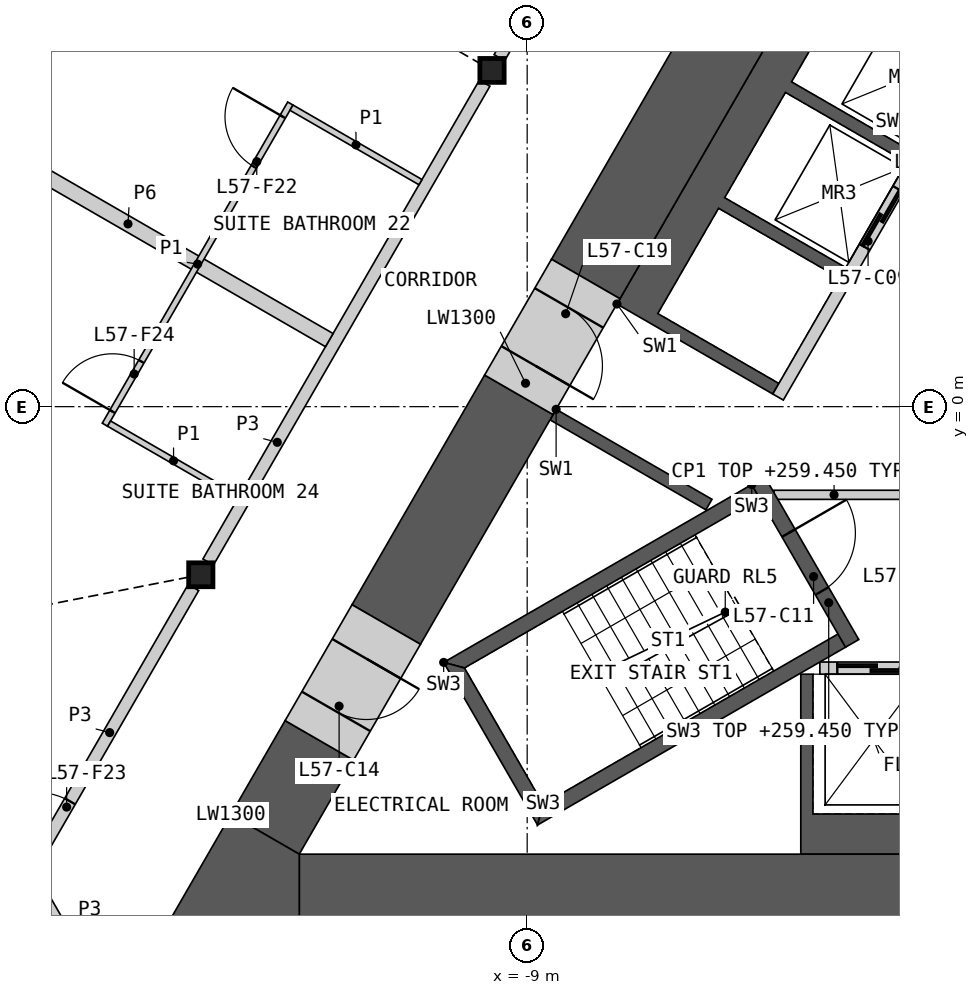
"""IFC4 building model, lengths in metres.
Left out: names, types, materials, properties, quantities, classifications, styles, units other than length and angle.
Written with IfcOpenShell. Run it as: python <this file> out.ifc"""

import sys

from ifc_helpers import new_model, si_unit, direction, frame, frame_2d, origin, origin_2d, place, context, subcontext, project, spatial, polyline, rectangle, i_section, outline, extrude, element, fill, save


model = new_model("IFC4")
c1 = context("Model", 3, precision=1e-05, world=origin(), true_north=direction((0.0, 1.0)))
c2 = subcontext(c1, "Body", "Model", "MODEL_VIEW")
j1 = project(units=[si_unit("LENGTHUNIT", "METRE"), si_unit("PLANEANGLEUNIT", "RADIAN")], contexts=[c1])
p1 = place(None, origin())
s1 = spatial("IfcSite", under=j1, at=p1, CompositionType="ELEMENT")
p2 = place(p1, origin())
s2 = spatial("IfcBuilding", under=s1, at=p2, CompositionType="ELEMENT")
p3 = place(p2, frame((0.0, 0.0, 256.2)))
s3 = spatial("IfcBuildingStorey", under=s2, at=p3, CompositionType="ELEMENT", Elevation=256.2)
for number, where, z_axis, x_axis in (
    (1, (-9.578, 5.53, 0.0), (0.0, 0.0, 1.0), (1.0, 0.0, 0.0)),
    (2, (-14.368, -2.765, 0.0), (0.0, 0.0, 1.0), (1.0, 0.0, 0.0)),
):
    element("IfcColumn", number, at=place(p3, frame(where, z_axis=z_axis, x_axis=x_axis)), inside=s3, PredefinedType="COLUMN", context=c2, shape_type="SweptSolid", body=[
        extrude(i_section(OverallWidth=0.399, OverallDepth=0.393, WebThickness=0.023, FlangeThickness=0.037, at=origin_2d()), origin(), (0.0, 0.0, 1.0), 3.6),
    ])
p4 = place(p3, origin())
e3 = element("IfcWall", 3, at=p4, inside=s3, PredefinedType="SHEAR", context=c2, shape_type="SweptSolid", body=[
    extrude(outline(polyline([(0.1, -7.36), (-4.5, -7.36), (-4.5, -4.4), (-4.3, -4.4), (-4.3, -6.7), (-2.3, -6.7), (-2.3, -4.4), (-2.1, -4.4), (-2.1, -6.7), (-0.1, -6.7), (-0.1, -4.4), (0.1, -4.4), (0.1, -7.36)])), origin(), (0.0, 0.0, 1.0), 3.25),
])
p5 = place(p3, frame((-4.187, -4.3, 0.0), z_axis=(0.0, 0.0, 1.0), x_axis=(1.0, 0.0, 0.0)))
e4 = element("IfcWall", 4, at=p5, inside=s3, PredefinedType="SOLIDWALL", context=c2, shape_type="SweptSolid", body=[
    extrude(rectangle(XDim=8.373, YDim=0.2, at=frame_2d((4.187, 0.0))), origin(), (0.0, 0.0, 1.0), 3.25),
])
p6 = place(p5, frame((0.287, 0.0, 0.0)))
e5 = element("IfcOpeningElement", 5, at=p6, cuts=e4, PredefinedType="OPENING", context=c2, shape_type="SweptSolid", body=[
    extrude(rectangle(XDim=1.2, YDim=2.1, at=frame_2d((0.6, 1.05))), frame((0.0, 0.11, 0.0), z_axis=(0.0, -1.0, 0.0), x_axis=(1.0, 0.0, 0.0)), (0.0, 0.0, 1.0), 0.22),
])
p7 = place(p5, frame((2.387, 0.0, 0.0)))
e6 = element("IfcOpeningElement", 6, at=p7, cuts=e4, PredefinedType="OPENING", context=c2, shape_type="SweptSolid", body=[
    extrude(rectangle(XDim=1.4, YDim=2.1, at=frame_2d((0.7, 1.05))), frame((0.0, 0.11, 0.0), z_axis=(0.0, -1.0, 0.0), x_axis=(1.0, 0.0, 0.0)), (0.0, 0.0, 1.0), 0.22),
])
p8 = place(p5, frame((4.837, 0.0, 0.0)))
e7 = element("IfcOpeningElement", 7, at=p8, cuts=e4, PredefinedType="OPENING", context=c2, shape_type="SweptSolid", body=[
    extrude(rectangle(XDim=0.9, YDim=2.1, at=frame_2d((0.45, 1.05))), frame((0.0, 0.11, 0.0), z_axis=(0.0, -1.0, 0.0), x_axis=(1.0, 0.0, 0.0)), (0.0, 0.0, 1.0), 0.22),
])
p9 = place(p5, frame((6.887, 0.0, 0.0)))
e8 = element("IfcOpeningElement", 8, at=p9, cuts=e4, PredefinedType="OPENING", context=c2, shape_type="SweptSolid", body=[
    extrude(rectangle(XDim=1.2, YDim=2.1, at=frame_2d((0.6, 1.05))), frame((0.0, 0.11, 0.0), z_axis=(0.0, -1.0, 0.0), x_axis=(1.0, 0.0, 0.0)), (0.0, 0.0, 1.0), 0.22),
])
p10 = place(p3, origin())
e9 = element("IfcWall", 9, at=p10, inside=s3, PredefinedType="SHEAR", context=c2, shape_type="SweptSolid", body=[
    extrude(outline(polyline([(-7.524, 1.688), (-4.124, 7.577), (-3.731, 7.35), (-1.561, 6.097), (-1.66, 5.924), (-3.652, 7.074), (-4.652, 5.342), (-2.66, 4.192), (-2.76, 4.019), (-4.752, 5.169), (-5.752, 3.437), (-3.76, 2.287), (-3.861, 2.113), (-5.852, 3.263), (-6.852, 1.531), (-4.861, 0.381), (-4.96, 0.208), (-7.131, 1.461), (-7.524, 1.688)])), origin(), (0.0, 0.0, 1.0), 3.25),
])
p11 = place(p3, origin())
e10 = element("IfcWall", 10, at=p11, inside=s3, PredefinedType="SHEAR", context=c2, shape_type="SweptSolid", body=[
    extrude(outline(polyline([(-8.524, -0.044), (-8.131, -0.271), (-5.96, -1.524), (-6.061, -1.697), (-8.231, -0.444), (-8.624, -0.217), (-8.524, -0.044)])), origin(), (0.0, 0.0, 1.0), 3.25),
])
p12 = place(p3, frame((-1.631, 5.776, 0.0), z_axis=(0.0, 0.0, 1.0), x_axis=(-0.499992876559, -0.866029516466, 0.0)))
e11 = element("IfcWall", 11, at=p12, inside=s3, PredefinedType="SOLIDWALL", context=c2, shape_type="SweptSolid", body=[
    extrude(rectangle(XDim=6.486, YDim=0.2, at=frame_2d((3.243, 0.0))), origin(), (0.0, 0.0, 1.0), 3.25),
])
p13 = place(p12, frame((0.337, 0.0, 0.0)))
e12 = element("IfcOpeningElement", 12, at=p13, cuts=e11, PredefinedType="OPENING", context=c2, shape_type="SweptSolid", body=[
    extrude(rectangle(XDim=1.1, YDim=2.1, at=frame_2d((0.55, 1.05))), frame((0.0, 0.11, 0.0), z_axis=(0.0, -1.0, 0.0), x_axis=(1.0, 0.0, 0.0)), (0.0, 0.0, 1.0), 0.22),
])
p14 = place(p12, frame((2.537, 0.0, 0.0)))
e13 = element("IfcOpeningElement", 13, at=p14, cuts=e11, PredefinedType="OPENING", context=c2, shape_type="SweptSolid", body=[
    extrude(rectangle(XDim=1.1, YDim=2.1, at=frame_2d((0.55, 1.05))), frame((0.0, 0.11, 0.0), z_axis=(0.0, -1.0, 0.0), x_axis=(1.0, 0.0, 0.0)), (0.0, 0.0, 1.0), 0.22),
])
p15 = place(p3, frame((-4.941, -1.45, 0.0), z_axis=(0.0, 0.0, 1.0), x_axis=(1.0, 0.0, 0.0)))
e14 = element("IfcWall", 14, at=p15, inside=s3, PredefinedType="PARTITIONING", context=c2, shape_type="SweptSolid", body=[
    extrude(rectangle(XDim=9.882, YDim=0.15, at=frame_2d((4.941, 0.0))), origin(), (0.0, 0.0, 1.0), 3.25),
])
p16 = place(p15, frame((4.391, 0.0, 0.0)))
e15 = element("IfcOpeningElement", 15, at=p16, cuts=e14, PredefinedType="OPENING", context=c2, shape_type="SweptSolid", body=[
    extrude(rectangle(XDim=1.1, YDim=2.1, at=frame_2d((0.55, 1.05))), frame((0.0, 0.085, 0.0), z_axis=(0.0, -1.0, 0.0), x_axis=(1.0, 0.0, 0.0)), (0.0, 0.0, 1.0), 0.17),
])
p17 = place(p3, origin())
e16 = element("IfcWall", 16, at=p17, inside=s3, PredefinedType="SHEAR", context=c2, shape_type="SweptSolid", body=[
    extrude(outline(polyline([(-5.307, -1.281), (-10.374, -4.206), (-10.032, -4.298), (-5.182, -1.498), (-5.307, -1.281)])), origin(), (0.0, 0.0, 1.0), 3.25),
])
p18 = place(p3, origin())
e17 = element("IfcWall", 17, at=p18, inside=s3, PredefinedType="SHEAR", context=c2, shape_type="SweptSolid", body=[
    extrude(outline(polyline([(-10.374, -4.206), (-8.83, -6.881), (-8.738, -6.539), (-10.032, -4.298), (-10.374, -4.206)])), origin(), (0.0, 0.0, 1.0), 3.25),
])
p19 = place(p3, origin())
e18 = element("IfcWall", 18, at=p19, inside=s3, PredefinedType="SHEAR", context=c2, shape_type="SweptSolid", body=[
    extrude(outline(polyline([(-8.738, -6.539), (-8.83, -6.881), (-3.763, -3.956), (-3.888, -3.739), (-8.738, -6.539)])), origin(), (0.0, 0.0, 1.0), 3.25),
])
p20 = place(p3, frame((-5.199, -1.219, 0.0), z_axis=(0.0, 0.0, 1.0), x_axis=(0.499982516597, -0.866035497597, 0.0)))
e19 = element("IfcWall", 19, at=p20, inside=s3, PredefinedType="SHEAR", context=c2, shape_type="SweptSolid", body=[
    extrude(rectangle(XDim=3.088, YDim=0.25, at=frame_2d((1.544, 0.0))), origin(), (0.0, 0.0, 1.0), 3.25),
])
p21 = place(p20, frame((0.994, 0.0, 0.0)))
e20 = element("IfcOpeningElement", 20, at=p21, cuts=e19, PredefinedType="OPENING", context=c2, shape_type="SweptSolid", body=[
    extrude(rectangle(XDim=1.1, YDim=2.1, at=frame_2d((0.55, 1.05))), frame((0.0, 0.135, 0.0), z_axis=(0.0, -1.0, 0.0), x_axis=(1.0, 0.0, 0.0)), (0.0, 0.0, 1.0), 0.27),
])
p22 = place(p3, frame((-12.748, -8.01, 0.0), z_axis=(0.0, 0.0, 1.0), x_axis=(1.0, 0.0, 0.0)))
e21 = element("IfcWall", 21, at=p22, inside=s3, PredefinedType="SHEAR", context=c2, shape_type="SweptSolid", body=[
    extrude(rectangle(XDim=25.497, YDim=1.3, at=frame_2d((12.748, 0.0))), origin(), (0.0, 0.0, 1.0), 3.25),
])
p23 = place(p3, frame((-4.245, 8.668, 0.0), z_axis=(0.0, 0.0, 1.0), x_axis=(-0.500002971097, -0.866023688414, 0.0)))
e22 = element("IfcWall", 22, at=p23, inside=s3, PredefinedType="SHEAR", context=c2, shape_type="SweptSolid", body=[
    extrude(rectangle(XDim=7.584, YDim=1.3, at=frame_2d((3.792, 0.0))), origin(), (0.0, 0.0, 1.0), 3.25),
])
p24 = place(p3, frame((-9.137, 0.195, 0.0), z_axis=(0.0, 0.0, 1.0), x_axis=(-0.499985697398, -0.866033661238, 0.0)))
e23 = element("IfcWall", 23, at=p24, inside=s3, PredefinedType="SHEAR", context=c2, shape_type="SweptSolid", body=[
    extrude(rectangle(XDim=4.362, YDim=1.3, at=frame_2d((2.181, 0.0))), origin(), (0.0, 0.0, 1.0), 3.25),
])
p25 = place(p3, frame((-12.418, -5.488, 0.0), z_axis=(0.0, 0.0, 1.0), x_axis=(-0.499931460552, -0.866064971437, 0.0)))
e24 = element("IfcWall", 24, at=p25, inside=s3, PredefinedType="SHEAR", context=c2, shape_type="SweptSolid", body=[
    extrude(rectangle(XDim=1.786, YDim=1.3, at=frame_2d((0.893, 0.0))), origin(), (0.0, 0.0, 1.0), 3.25),
])
p26 = place(p3, origin())
e25 = element("IfcWall", 25, at=p26, inside=s3, PredefinedType="SHEAR", context=c2, shape_type="SweptSolid", body=[
    extrude(outline(polyline([(-13.874, -6.71), (-12.748, -7.36), (-12.748, -8.66), (-15.0, -8.66), (-13.874, -6.71)])), origin(), (0.0, 0.0, 1.0), 3.25),
])
p27 = place(p3, frame((-11.318, -3.583, 0.0), z_axis=(0.0, 0.0, 1.0), x_axis=(-0.50002983664, -0.866008176907, 0.0)))
e26 = element("IfcWall", 26, at=p27, inside=s3, PredefinedType="SHEAR", context=c2, shape_type="SweptSolid", body=[
    extrude(rectangle(XDim=2.2, YDim=1.3, at=frame_2d((1.1, 0.0))), origin(), (0.0, 0.0, 1.0), 3.25),
])
p28 = place(p27, frame((0.65, 0.0, 0.0)))
e27 = element("IfcOpeningElement", 27, at=p28, cuts=e26, PredefinedType="OPENING", context=c2, shape_type="SweptSolid", body=[
    extrude(rectangle(XDim=1.0, YDim=2.1, at=frame_2d((0.5, 1.05))), frame((0.0, 0.66, 0.0), z_axis=(0.0, -1.0, 0.0), x_axis=(1.0, 0.0, 0.0)), (0.0, 0.0, 1.0), 1.32),
])
p29 = place(p3, frame((-8.037, 2.1, 0.0), z_axis=(0.0, 0.0, 1.0), x_axis=(-0.50002983664, -0.866008176907, 0.0)))
e28 = element("IfcWall", 28, at=p29, inside=s3, PredefinedType="SHEAR", context=c2, shape_type="SweptSolid", body=[
    extrude(rectangle(XDim=2.2, YDim=1.3, at=frame_2d((1.1, 0.0))), origin(), (0.0, 0.0, 1.0), 3.25),
])
p30 = place(p29, frame((0.55, 0.0, 0.0)))
e29 = element("IfcOpeningElement", 29, at=p30, cuts=e28, PredefinedType="OPENING", context=c2, shape_type="SweptSolid", body=[
    extrude(rectangle(XDim=1.1, YDim=2.1, at=frame_2d((0.55, 1.05))), frame((0.0, 0.66, 0.0), z_axis=(0.0, -1.0, 0.0), x_axis=(1.0, 0.0, 0.0)), (0.0, 0.0, 1.0), 1.32),
])
p31 = place(p3, frame((-14.247, -2.556, 0.0), z_axis=(0.0, 0.0, 1.0), x_axis=(0.49998193945, 0.866035830797, 0.0)))
e30 = element("IfcWall", 30, at=p31, inside=s3, PredefinedType="PARTITIONING", context=c2, shape_type="SweptSolid", body=[
    extrude(rectangle(XDim=9.094, YDim=0.2, at=frame_2d((4.547, 0.0))), origin(), (0.0, 0.0, 1.0), 3.25),
])
p32 = place(p3, frame((-9.458, 5.74, 0.0), z_axis=(0.0, 0.0, 1.0), x_axis=(0.50000207303, 0.866024206917, 0.0)))
e31 = element("IfcWall", 31, at=p32, inside=s3, PredefinedType="PARTITIONING", context=c2, shape_type="SweptSolid", body=[
    extrude(rectangle(XDim=9.095, YDim=0.2, at=frame_2d((4.547, 0.0))), origin(), (0.0, 0.0, 1.0), 3.25),
])
p33 = place(p32, frame((6.833, 0.0, 0.0)))
e32 = element("IfcOpeningElement", 32, at=p33, cuts=e31, PredefinedType="OPENING", context=c2, shape_type="SweptSolid", body=[
    extrude(rectangle(XDim=1.1, YDim=2.1, at=frame_2d((0.55, 1.05))), frame((0.0, 0.11, 0.0), z_axis=(0.0, -1.0, 0.0), x_axis=(1.0, 0.0, 0.0)), (0.0, 0.0, 1.0), 0.22),
])
p34 = place(p3, frame((-18.875, 4.917, 0.0), z_axis=(0.0, 0.0, 1.0), x_axis=(0.866017519557, -0.500013655634, 0.0)))
e33 = element("IfcWall", 33, at=p34, inside=s3, PredefinedType="PARTITIONING", context=c2, shape_type="SweptSolid", body=[
    extrude(rectangle(XDim=7.644, YDim=0.25, at=frame_2d((3.822, 0.0))), origin(), (0.0, 0.0, 1.0), 2.404),
])
p35 = place(p3, frame((-17.244, -7.747, 0.0), z_axis=(0.0, 0.0, 1.0), x_axis=(0.500017753321, 0.866015153657, 0.0)))
e34 = element("IfcWall", 34, at=p35, inside=s3, PredefinedType="PARTITIONING", context=c2, shape_type="SweptSolid", body=[
    extrude(rectangle(XDim=5.51, YDim=0.2, at=frame_2d((2.755, 0.0))), origin(), (0.0, 0.0, 1.0), 3.25),
])
p36 = place(p35, frame((0.35, 0.0, 0.0)))
e35 = element("IfcOpeningElement", 35, at=p36, cuts=e34, PredefinedType="OPENING", context=c2, shape_type="SweptSolid", body=[
    extrude(rectangle(XDim=1.1, YDim=2.1, at=frame_2d((0.55, 1.05))), frame((0.0, 0.11, 0.0), z_axis=(0.0, -1.0, 0.0), x_axis=(1.0, 0.0, 0.0)), (0.0, 0.0, 1.0), 0.22),
])
p37 = place(p3, frame((-17.144, -7.747, 0.0), z_axis=(0.0, 0.0, 1.0), x_axis=(0.499958791762, -0.866049194065, 0.0)))
e36 = element("IfcWall", 36, at=p37, inside=s3, PredefinedType="PARTITIONING", context=c2, shape_type="SweptSolid", body=[
    extrude(rectangle(XDim=3.726, YDim=0.2, at=frame_2d((1.863, 0.0))), origin(), (0.0, 0.0, 1.0), 3.25),
])
p38 = place(p37, frame((1.388, 0.0, 0.0)))
e37 = element("IfcOpeningElement", 37, at=p38, cuts=e36, PredefinedType="OPENING", context=c2, shape_type="SweptSolid", body=[
    extrude(rectangle(XDim=0.95, YDim=2.1, at=frame_2d((0.475, 1.05))), frame((0.0, 0.11, 0.0), z_axis=(0.0, -1.0, 0.0), x_axis=(1.0, 0.0, 0.0)), (0.0, 0.0, 1.0), 0.22),
])
p39 = place(p3, frame((-15.945, -0.297, 0.0), z_axis=(0.0, 0.0, 1.0), x_axis=(0.499978833458, 0.866037623948, 0.0)))
e38 = element("IfcWall", 38, at=p39, inside=s3, PredefinedType="PARTITIONING", context=c2, shape_type="SweptSolid", body=[
    extrude(rectangle(XDim=6.1, YDim=0.1, at=frame_2d((3.05, 0.0))), origin(), (0.0, 0.0, 1.0), 2.404),
])
p40 = place(p39, frame((4.9, 0.0, 0.0)))
e39 = element("IfcOpeningElement", 39, at=p40, cuts=e38, PredefinedType="OPENING", context=c2, shape_type="SweptSolid", body=[
    extrude(rectangle(XDim=0.95, YDim=2.1, at=frame_2d((0.475, 1.05))), frame((0.0, 0.06, 0.0), z_axis=(0.0, -1.0, 0.0), x_axis=(1.0, 0.0, 0.0)), (0.0, 0.0, 1.0), 0.12),
])
p41 = place(p39, frame((0.25, 0.0, 0.0)))
e40 = element("IfcOpeningElement", 40, at=p41, cuts=e38, PredefinedType="OPENING", context=c2, shape_type="SweptSolid", body=[
    extrude(rectangle(XDim=0.95, YDim=2.1, at=frame_2d((0.475, 1.05))), frame((0.0, 0.06, 0.0), z_axis=(0.0, -1.0, 0.0), x_axis=(1.0, 0.0, 0.0)), (0.0, 0.0, 1.0), 0.12),
])
for number, where, z_axis, x_axis in (
    (41, (-12.877, 4.917, 0.0), (0.0, 0.0, 1.0), (0.866, -0.5, 0.0)),
    (42, (-15.877, -0.279, 0.0), (0.0, 0.0, 1.0), (0.866, -0.5, 0.0)),
):
    element("IfcWall", number, at=place(p3, frame(where, z_axis=z_axis, x_axis=x_axis)), inside=s3, PredefinedType="PARTITIONING", context=c2, shape_type="SweptSolid", body=[
        extrude(rectangle(XDim=2.45, YDim=0.1, at=frame_2d((1.225, 0.0))), origin(), (0.0, 0.0, 1.0), 2.404),
    ])
p42 = place(p6, origin())
e43 = element("IfcDoor", 43, at=p42, inside=s3, OperationType="SLIDING_TO_LEFT", PredefinedType="DOOR", context=c2, shape_type="SweptSolid", body=[
    extrude(rectangle(XDim=1.2, YDim=2.1, at=frame_2d((0.6, 1.05))), frame((0.0, 0.025, 0.0), z_axis=(0.0, -1.0, 0.0), x_axis=(1.0, 0.0, 0.0)), (0.0, 0.0, 1.0), 0.05),
])
fill(e5, e43)
p43 = place(p14, origin())
e44 = element("IfcDoor", 44, at=p43, inside=s3, OperationType="SLIDING_TO_LEFT", PredefinedType="DOOR", context=c2, shape_type="SweptSolid", body=[
    extrude(rectangle(XDim=1.1, YDim=2.1, at=frame_2d((0.55, 1.05))), frame((0.0, 0.025, 0.0), z_axis=(0.0, -1.0, 0.0), x_axis=(1.0, 0.0, 0.0)), (0.0, 0.0, 1.0), 0.05),
])
fill(e13, e44)
p44 = place(p21, origin())
e45 = element("IfcDoor", 45, at=p44, inside=s3, OperationType="SINGLE_SWING_LEFT", PredefinedType="DOOR", context=c2, shape_type="SweptSolid", body=[
    extrude(rectangle(XDim=1.1, YDim=2.1, at=frame_2d((0.55, 1.05))), frame((0.0, 0.025, 0.0), z_axis=(0.0, -1.0, 0.0), x_axis=(1.0, 0.0, 0.0)), (0.0, 0.0, 1.0), 0.05),
])
fill(e20, e45)
p45 = place(p28, origin())
e46 = element("IfcDoor", 46, at=p45, inside=s3, OperationType="SINGLE_SWING_LEFT", PredefinedType="DOOR", context=c2, shape_type="SweptSolid", body=[
    extrude(rectangle(XDim=1.0, YDim=2.1, at=frame_2d((0.5, 1.05))), frame((0.0, 0.405, 0.0), z_axis=(0.0, -1.0, 0.0), x_axis=(1.0, 0.0, 0.0)), (0.0, 0.0, 1.0), 0.05),
])
fill(e27, e46)
p46 = place(p30, origin())
e47 = element("IfcDoor", 47, at=p46, inside=s3, OperationType="SINGLE_SWING_RIGHT", PredefinedType="DOOR", context=c2, shape_type="SweptSolid", body=[
    extrude(rectangle(XDim=1.1, YDim=2.1, at=frame_2d((0.55, 1.05))), frame((0.0, 0.405, 0.0), z_axis=(0.0, -1.0, 0.0), x_axis=(1.0, 0.0, 0.0)), (0.0, 0.0, 1.0), 0.05),
])
fill(e29, e47)
p47 = place(p40, origin())
e48 = element("IfcDoor", 48, at=p47, inside=s3, OperationType="SINGLE_SWING_RIGHT", PredefinedType="DOOR", context=c2, shape_type="SweptSolid", body=[
    extrude(rectangle(XDim=0.95, YDim=2.1, at=frame_2d((0.475, 1.05))), frame((0.0, 0.025, 0.0), z_axis=(0.0, -1.0, 0.0), x_axis=(1.0, 0.0, 0.0)), (0.0, 0.0, 1.0), 0.05),
])
fill(e39, e48)
p48 = place(p36, origin())
e49 = element("IfcDoor", 49, at=p48, inside=s3, OperationType="SINGLE_SWING_LEFT", PredefinedType="DOOR", context=c2, shape_type="SweptSolid", body=[
    extrude(rectangle(XDim=1.1, YDim=2.1, at=frame_2d((0.55, 1.05))), frame((0.0, 0.025, 0.0), z_axis=(0.0, -1.0, 0.0), x_axis=(1.0, 0.0, 0.0)), (0.0, 0.0, 1.0), 0.05),
])
fill(e35, e49)
p49 = place(p41, origin())
e50 = element("IfcDoor", 50, at=p49, inside=s3, OperationType="SINGLE_SWING_LEFT", PredefinedType="DOOR", context=c2, shape_type="SweptSolid", body=[
    extrude(rectangle(XDim=0.95, YDim=2.1, at=frame_2d((0.475, 1.05))), frame((0.0, 0.025, 0.0), z_axis=(0.0, -1.0, 0.0), x_axis=(1.0, 0.0, 0.0)), (0.0, 0.0, 1.0), 0.05),
])
fill(e40, e50)
save(model, sys.argv[1])
